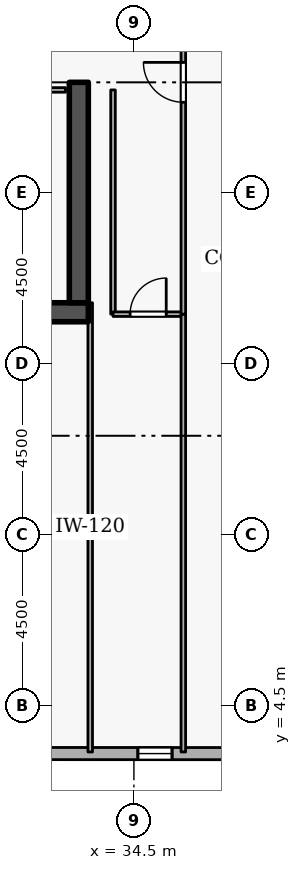
"""IFC4 building model, lengths in metres.
Left out: names, types, materials, properties, quantities, classifications, styles, units other than length and angle.
Written with IfcOpenShell. Run it as: python <this file> out.ifc"""

import sys

from ifc_helpers import new_model, si_unit, direction, frame, frame_2d, origin, place, context, subcontext, project, spatial, rectangle, extrude, element, fill, save


model = new_model("IFC4")
c1 = context("Model", 3, precision=1e-05, world=origin(), true_north=direction((0.0, 1.0)))
c2 = subcontext(c1, "Body", "Model", "MODEL_VIEW")
j1 = project(units=[si_unit("LENGTHUNIT", "METRE"), si_unit("PLANEANGLEUNIT", "RADIAN")], contexts=[c1])
p1 = place(None, origin())
s1 = spatial("IfcSite", under=j1, at=p1, CompositionType="ELEMENT")
p2 = place(p1, origin())
s2 = spatial("IfcBuilding", under=s1, at=p2, CompositionType="ELEMENT")
p3 = place(p2, frame((0.0, 0.0, 229.5)))
s3 = spatial("IfcBuildingStorey", under=s2, at=p3, CompositionType="ELEMENT", Elevation=229.5)
p4 = place(p3, frame((17.7, 14.85, 0.0), z_axis=(0.0, 0.0, 1.0), x_axis=(1.0, 0.0, 0.0)))
e1 = element("IfcWall", 1, at=p4, inside=s3, PredefinedType="SHEAR", context=c2, shape_type="SweptSolid", body=[
    extrude(rectangle(XDim=15.6, YDim=0.5, at=frame_2d((7.8, 0.0))), origin(), (0.0, 0.0, 1.0), 3.6),
])
p5 = place(p3, frame((33.05, 15.1, 0.0), z_axis=(0.0, 0.0, 1.0), x_axis=(0.0, 1.0, 0.0)))
e2 = element("IfcWall", 2, at=p5, inside=s3, PredefinedType="SHEAR", context=c2, shape_type="SweptSolid", body=[
    extrude(rectangle(XDim=5.8, YDim=0.5, at=frame_2d((2.9, 0.0))), origin(), (0.0, 0.0, 1.0), 3.6),
])
p6 = place(p3, frame((7.904, 3.247, 0.0), z_axis=(0.0, 0.0, 1.0), x_axis=(0.999999933399, -0.000364968916, 0.0)))
e3 = element("IfcWall", 3, at=p6, inside=s3, PredefinedType="STANDARD", context=c2, shape_type="SweptSolid", body=[
    extrude(rectangle(XDim=32.778, YDim=0.32, at=frame_2d((16.389, 0.0))), origin(), (0.0, 0.0, 1.0), 2.7),
])
p7 = place(p6, frame((2.7, 0.0, 0.72)))
e4 = element("IfcOpeningElement", 4, at=p7, cuts=e3, PredefinedType="OPENING", context=c2, shape_type="SweptSolid", body=[
    extrude(rectangle(XDim=0.9, YDim=1.75, at=frame_2d((0.45, 0.875))), frame((0.0, 0.17, 0.0), z_axis=(0.0, -1.0, 0.0), x_axis=(1.0, 0.0, 0.0)), (0.0, 0.0, 1.0), 0.34),
])
p8 = place(p6, frame((12.3, 0.0, 0.72)))
e5 = element("IfcOpeningElement", 5, at=p8, cuts=e3, PredefinedType="OPENING", context=c2, shape_type="SweptSolid", body=[
    extrude(rectangle(XDim=0.9, YDim=1.75, at=frame_2d((0.45, 0.875))), frame((0.0, 0.17, 0.0), z_axis=(0.0, -1.0, 0.0), x_axis=(1.0, 0.0, 0.0)), (0.0, 0.0, 1.0), 0.34),
])
p9 = place(p6, frame((17.1, 0.0, 0.72)))
e6 = element("IfcOpeningElement", 6, at=p9, cuts=e3, PredefinedType="OPENING", context=c2, shape_type="SweptSolid", body=[
    extrude(rectangle(XDim=0.9, YDim=1.75, at=frame_2d((0.45, 0.875))), frame((0.0, 0.17, 0.0), z_axis=(0.0, -1.0, 0.0), x_axis=(1.0, 0.0, 0.0)), (0.0, 0.0, 1.0), 0.34),
])
p10 = place(p6, frame((21.9, 0.0, 0.72)))
e7 = element("IfcOpeningElement", 7, at=p10, cuts=e3, PredefinedType="OPENING", context=c2, shape_type="SweptSolid", body=[
    extrude(rectangle(XDim=0.9, YDim=1.75, at=frame_2d((0.45, 0.875))), frame((0.0, 0.17, 0.0), z_axis=(0.0, -1.0, 0.0), x_axis=(1.0, 0.0, 0.0)), (0.0, 0.0, 1.0), 0.34),
])
p11 = place(p6, frame((26.7, 0.0, 0.72)))
e8 = element("IfcOpeningElement", 8, at=p11, cuts=e3, PredefinedType="OPENING", context=c2, shape_type="SweptSolid", body=[
    extrude(rectangle(XDim=0.9, YDim=1.75, at=frame_2d((0.45, 0.875))), frame((0.0, 0.17, 0.0), z_axis=(0.0, -1.0, 0.0), x_axis=(1.0, 0.0, 0.0)), (0.0, 0.0, 1.0), 0.34),
])
p12 = place(p3, frame((30.6, 20.7, 0.0), z_axis=(0.0, 0.0, 1.0), x_axis=(1.0, 0.0, 0.0)))
e9 = element("IfcWall", 9, at=p12, inside=s3, PredefinedType="PARTITIONING", context=c2, shape_type="SweptSolid", body=[
    extrude(rectangle(XDim=2.1, YDim=0.12, at=frame_2d((1.05, 0.0))), origin(), (0.0, 0.0, 1.0), 3.3),
])
p13 = place(p12, frame((0.575, 0.0, 0.0)))
e10 = element("IfcOpeningElement", 10, at=p13, cuts=e9, PredefinedType="OPENING", context=c2, shape_type="SweptSolid", body=[
    extrude(rectangle(XDim=0.95, YDim=2.1, at=frame_2d((0.475, 1.05))), frame((0.0, 0.07, 0.0), z_axis=(0.0, -1.0, 0.0), x_axis=(1.0, 0.0, 0.0)), (0.0, 0.0, 1.0), 0.14),
])
p14 = place(p3, frame((33.95, 20.7, 0.0), z_axis=(0.0, 0.0, 1.0), x_axis=(0.0, -1.0, 0.0)))
e11 = element("IfcWall", 11, at=p14, inside=s3, PredefinedType="PARTITIONING", context=c2, shape_type="SweptSolid", body=[
    extrude(rectangle(XDim=5.9, YDim=0.12, at=frame_2d((2.95, 0.0))), origin(), (0.0, 0.0, 1.0), 3.3),
])
p15 = place(p3, frame((33.95, 14.8, 0.0), z_axis=(0.0, 0.0, 1.0), x_axis=(1.0, 0.0, 0.0)))
e12 = element("IfcWall", 12, at=p15, inside=s3, PredefinedType="PARTITIONING", context=c2, shape_type="SweptSolid", body=[
    extrude(rectangle(XDim=1.85, YDim=0.12, at=frame_2d((0.925, 0.0))), origin(), (0.0, 0.0, 1.0), 3.3),
])
p16 = place(p15, frame((0.45, 0.0, 0.0)))
e13 = element("IfcOpeningElement", 13, at=p16, cuts=e12, PredefinedType="OPENING", context=c2, shape_type="SweptSolid", body=[
    extrude(rectangle(XDim=0.95, YDim=2.1, at=frame_2d((0.475, 1.05))), frame((0.0, 0.07, 0.0), z_axis=(0.0, -1.0, 0.0), x_axis=(1.0, 0.0, 0.0)), (0.0, 0.0, 1.0), 0.14),
])
p17 = place(p3, frame((35.8, 14.8, 0.0), z_axis=(0.0, 0.0, 1.0), x_axis=(0.0, -1.0, 0.0)))
e14 = element("IfcWall", 14, at=p17, inside=s3, PredefinedType="PARTITIONING", context=c2, shape_type="SweptSolid", body=[
    extrude(rectangle(XDim=11.52, YDim=0.12, at=frame_2d((5.76, 0.0))), origin(), (0.0, 0.0, 1.0), 3.3),
])
p18 = place(p3, frame((33.35, 3.28, 0.0), z_axis=(0.0, 0.0, 1.0), x_axis=(0.0, 1.0, 0.0)))
e15 = element("IfcWall", 15, at=p18, inside=s3, PredefinedType="PARTITIONING", context=c2, shape_type="SweptSolid", body=[
    extrude(rectangle(XDim=11.82, YDim=0.12, at=frame_2d((5.91, 0.0))), origin(), (0.0, 0.0, 1.0), 2.505),
])
p19 = place(p3, frame((35.8, 14.8, 0.0), z_axis=(0.0, 0.0, 1.0), x_axis=(0.0, 1.0, 0.0)))
e16 = element("IfcWall", 16, at=p19, inside=s3, PredefinedType="PARTITIONING", context=c2, shape_type="SweptSolid", body=[
    extrude(rectangle(XDim=12.2, YDim=0.12, at=frame_2d((6.1, 0.0))), origin(), (0.0, 0.0, 1.0), 3.3),
])
p20 = place(p19, frame((5.575, 0.0, 0.0)))
e17 = element("IfcOpeningElement", 17, at=p20, cuts=e16, PredefinedType="OPENING", context=c2, shape_type="SweptSolid", body=[
    extrude(rectangle(XDim=1.05, YDim=2.1, at=frame_2d((0.525, 1.05))), frame((0.0, 0.07, 0.0), z_axis=(0.0, -1.0, 0.0), x_axis=(1.0, 0.0, 0.0)), (0.0, 0.0, 1.0), 0.14),
])
p21 = place(p11, origin())
e18 = element("IfcWindow", 18, at=p21, inside=s3, PartitioningType="SINGLE_PANEL", PredefinedType="WINDOW", context=c2, shape_type="SweptSolid", body=[
    extrude(rectangle(XDim=0.9, YDim=1.75, at=frame_2d((0.45, 0.875))), frame((0.0, 0.03, 0.0), z_axis=(0.0, -1.0, 0.0), x_axis=(1.0, 0.0, 0.0)), (0.0, 0.0, 1.0), 0.06),
])
fill(e8, e18)
p22 = place(p16, origin())
e19 = element("IfcDoor", 19, at=p22, inside=s3, OperationType="SINGLE_SWING_RIGHT", PredefinedType="DOOR", context=c2, shape_type="SweptSolid", body=[
    extrude(rectangle(XDim=0.95, YDim=2.1, at=frame_2d((0.475, 1.05))), frame((0.0, 0.025, 0.0), z_axis=(0.0, -1.0, 0.0), x_axis=(1.0, 0.0, 0.0)), (0.0, 0.0, 1.0), 0.05),
])
fill(e13, e19)
p23 = place(p20, origin())
e20 = element("IfcDoor", 20, at=p23, inside=s3, OperationType="SINGLE_SWING_RIGHT", PredefinedType="DOOR", context=c2, shape_type="SweptSolid", body=[
    extrude(rectangle(XDim=1.05, YDim=2.1, at=frame_2d((0.525, 1.05))), frame((0.0, 0.025, 0.0), z_axis=(0.0, -1.0, 0.0), x_axis=(1.0, 0.0, 0.0)), (0.0, 0.0, 1.0), 0.05),
])
fill(e17, e20)
save(model, sys.argv[1])
